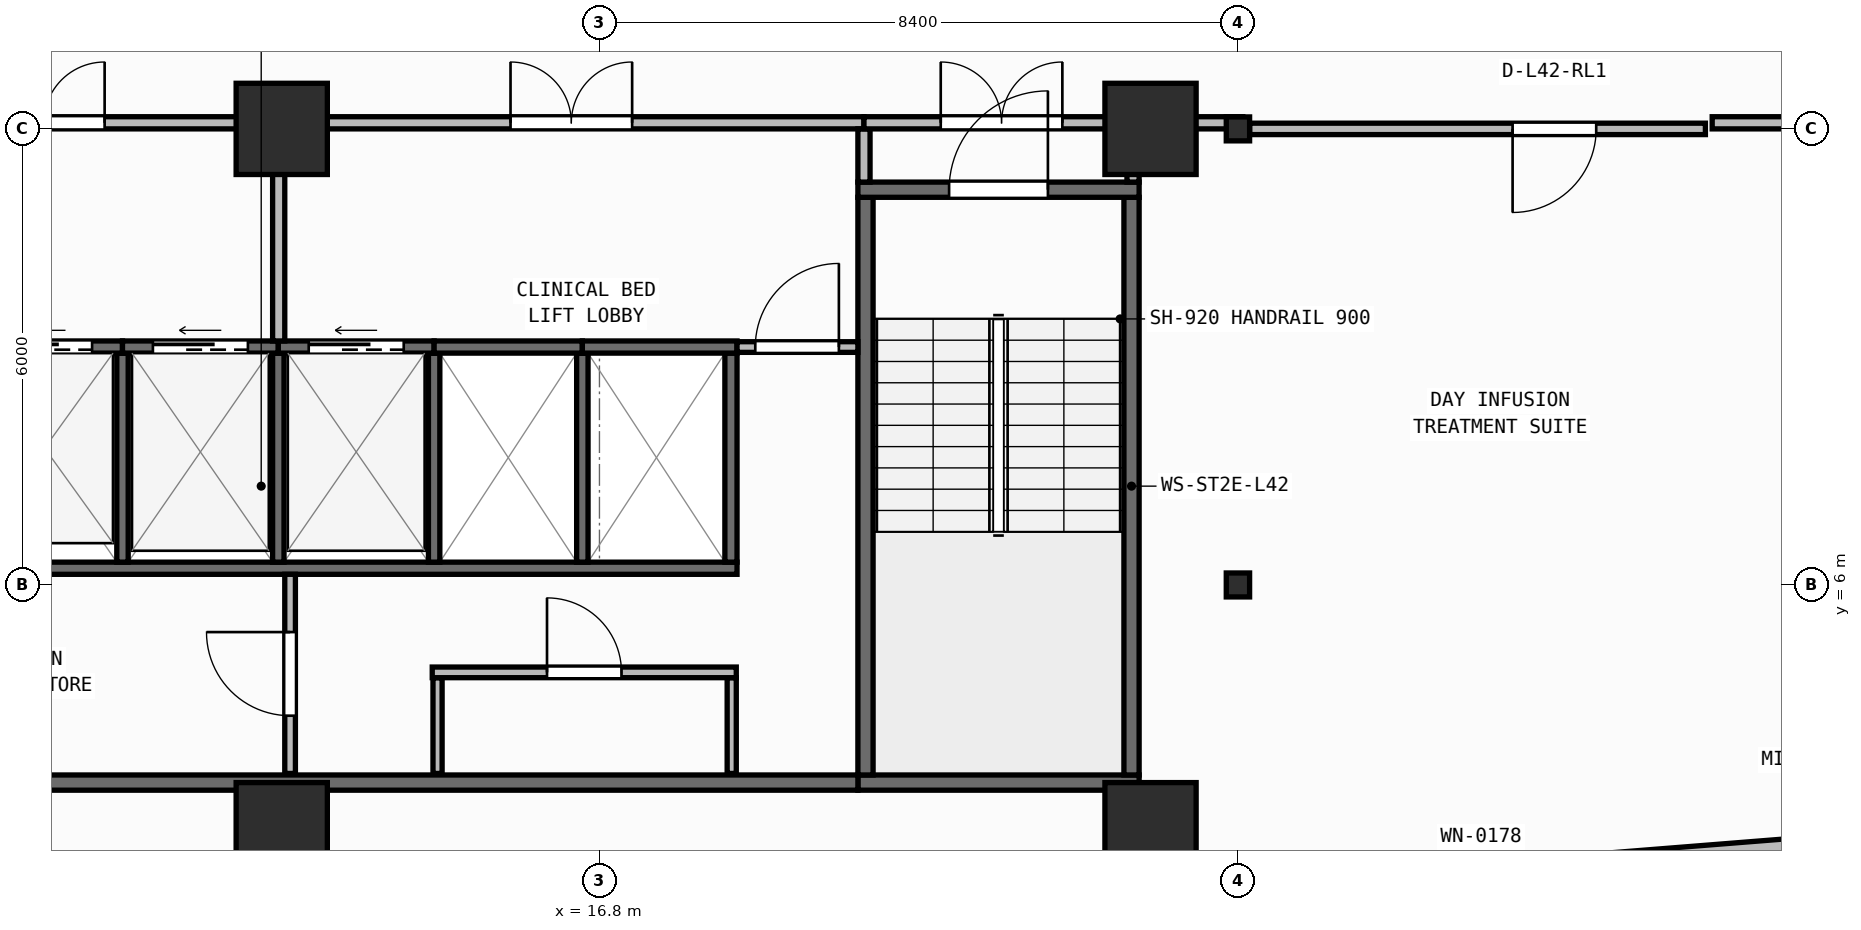
"""IFC4 building model, lengths in metres.
Left out: names, types, materials, properties, quantities, classifications, styles, units other than length and angle.
Written with IfcOpenShell. Run it as: python <this file> out.ifc"""

import sys

from ifc_helpers import new_model, si_unit, direction, frame, frame_2d, origin, origin_2d, place, context, subcontext, project, spatial, rectangle, i_section, extrude, element, fill, save


model = new_model("IFC4")
c1 = context("Model", 3, precision=1e-05, world=origin(), true_north=direction((0.0, 1.0)))
c2 = subcontext(c1, "Body", "Model", "MODEL_VIEW")
j1 = project(units=[si_unit("LENGTHUNIT", "METRE"), si_unit("PLANEANGLEUNIT", "RADIAN")], contexts=[c1])
p1 = place(None, origin())
s1 = spatial("IfcSite", under=j1, at=p1, CompositionType="ELEMENT")
p2 = place(p1, origin())
s2 = spatial("IfcBuilding", under=s1, at=p2, CompositionType="ELEMENT")
p3 = place(p2, frame((0.0, 0.0, 170.5)))
s3 = spatial("IfcBuildingStorey", under=s2, at=p3, CompositionType="ELEMENT", Elevation=170.5)
for number, where, z_axis, x_axis in (
    (1, (12.62, 2.8, 0.0), (0.0, 0.0, 1.0), (1.0, 0.0, 0.0)),
    (2, (24.05, 2.8, 0.0), (0.0, 0.0, 1.0), (1.0, 0.0, 0.0)),
):
    element("IfcColumn", number, at=place(p3, frame(where, z_axis=z_axis, x_axis=x_axis)), inside=s3, PredefinedType="COLUMN", context=c2, shape_type="SweptSolid", body=[
        extrude(rectangle(XDim=1.2, YDim=1.2, at=origin_2d()), origin(), (0.0, 0.0, 1.0), 3.95),
    ])
p4 = place(p3, frame((25.2, 6.0, 0.0), z_axis=(0.0, 0.0, 1.0), x_axis=(1.0, 0.0, 0.0)))
e3 = element("IfcColumn", 3, at=p4, inside=s3, PredefinedType="COLUMN", context=c2, shape_type="SweptSolid", body=[
    extrude(i_section(OverallWidth=0.307, OverallDepth=0.315, WebThickness=0.012, FlangeThickness=0.019, FilletRadius=0.017, at=origin_2d()), origin(), (0.0, 0.0, 1.0), 3.95),
])
for number, where, z_axis, x_axis in (
    (4, (12.62, 12.0, 0.0), (0.0, 0.0, 1.0), (1.0, 0.0, 0.0)),
    (5, (24.05, 12.0, 0.0), (0.0, 0.0, 1.0), (1.0, 0.0, 0.0)),
):
    element("IfcColumn", number, at=place(p3, frame(where, z_axis=z_axis, x_axis=x_axis)), inside=s3, PredefinedType="COLUMN", context=c2, shape_type="SweptSolid", body=[
        extrude(rectangle(XDim=1.2, YDim=1.2, at=origin_2d()), origin(), (0.0, 0.0, 1.0), 3.95),
    ])
p5 = place(p3, frame((25.2, 12.0, 0.0), z_axis=(0.0, 0.0, 1.0), x_axis=(1.0, 0.0, 0.0)))
e6 = element("IfcColumn", 6, at=p5, inside=s3, PredefinedType="COLUMN", context=c2, shape_type="SweptSolid", body=[
    extrude(i_section(OverallWidth=0.307, OverallDepth=0.315, WebThickness=0.012, FlangeThickness=0.019, FilletRadius=0.017, at=origin_2d()), origin(), (0.0, 0.0, 1.0), 3.95),
])
p6 = place(p3, frame((2.76, 0.173, 0.0), z_axis=(0.0, 0.0, 1.0), x_axis=(0.996857931723, 0.079210251617, 0.0)))
e7 = element("IfcWall", 7, at=p6, inside=s3, PredefinedType="STANDARD", context=c2, shape_type="SweptSolid", body=[
    extrude(rectangle(XDim=51.442, YDim=0.26, at=frame_2d((25.721, 0.0))), origin(), (0.0, 0.0, 1.0), 3.67),
])
p7 = place(p6, frame((24.521, 0.0, 0.9)))
e8 = element("IfcOpeningElement", 8, at=p7, cuts=e7, PredefinedType="OPENING", context=c2, shape_type="SweptSolid", body=[
    extrude(rectangle(XDim=2.4, YDim=1.65, at=frame_2d((1.2, 0.825))), frame((0.0, 0.14, 0.0), z_axis=(0.0, -1.0, 0.0), x_axis=(1.0, 0.0, 0.0)), (0.0, 0.0, 1.0), 0.28),
])
p8 = place(p3, frame((20.2, 3.4, 0.0), z_axis=(0.0, 0.0, 1.0), x_axis=(1.0, 0.0, 0.0)))
e9 = element("IfcWall", 9, at=p8, inside=s3, PredefinedType="SHEAR", context=c2, shape_type="SweptSolid", body=[
    extrude(rectangle(XDim=3.7, YDim=0.2, at=frame_2d((1.85, 0.0))), origin(), (0.0, 0.0, 1.0), 3.67),
])
for number, where, z_axis, x_axis in (
    (10, (20.3, 3.5, 0.0), (0.0, 0.0, 1.0), (0.0, 1.0, 0.0)),
    (11, (23.8, 3.5, 0.0), (0.0, 0.0, 1.0), (0.0, 1.0, 0.0)),
):
    element("IfcWall", number, at=place(p3, frame(where, z_axis=z_axis, x_axis=x_axis)), inside=s3, PredefinedType="SHEAR", context=c2, shape_type="SweptSolid", body=[
        extrude(rectangle(XDim=7.6, YDim=0.2, at=frame_2d((3.8, 0.0))), origin(), (0.0, 0.0, 1.0), 3.67),
    ])
p9 = place(p3, frame((20.2, 11.2, 0.0), z_axis=(0.0, 0.0, 1.0), x_axis=(1.0, 0.0, 0.0)))
e12 = element("IfcWall", 12, at=p9, inside=s3, PredefinedType="SHEAR", context=c2, shape_type="SweptSolid", body=[
    extrude(rectangle(XDim=3.7, YDim=0.2, at=frame_2d((1.85, 0.0))), origin(), (0.0, 0.0, 1.0), 3.67),
])
p10 = place(p9, frame((1.2, 0.0, 0.0)))
e13 = element("IfcOpeningElement", 13, at=p10, cuts=e12, PredefinedType="OPENING", context=c2, shape_type="SweptSolid", body=[
    extrude(rectangle(XDim=1.3, YDim=2.15, at=frame_2d((0.65, 1.075))), frame((0.0, 0.11, 0.0), z_axis=(0.0, -1.0, 0.0), x_axis=(1.0, 0.0, 0.0)), (0.0, 0.0, 1.0), 0.22),
])
p11 = place(p3, frame((6.5, 3.4, 0.0), z_axis=(0.0, 0.0, 1.0), x_axis=(1.0, 0.0, 0.0)))
e14 = element("IfcWall", 14, at=p11, inside=s3, PredefinedType="SHEAR", context=c2, shape_type="SweptSolid", body=[
    extrude(rectangle(XDim=13.7, YDim=0.2, at=frame_2d((6.85, 0.0))), origin(), (0.0, 0.0, 1.0), 3.67),
])
p12 = place(p3, frame((6.5, 6.22, 0.0), z_axis=(0.0, 0.0, 1.0), x_axis=(1.0, 0.0, 0.0)))
e15 = element("IfcWall", 15, at=p12, inside=s3, PredefinedType="SHEAR", context=c2, shape_type="SweptSolid", body=[
    extrude(rectangle(XDim=12.11, YDim=0.16, at=frame_2d((6.055, 0.0))), origin(), (0.0, 0.0, 1.0), 3.67),
])
p13 = place(p3, frame((18.53, 6.3, 0.0), z_axis=(0.0, 0.0, 1.0), x_axis=(0.0, 1.0, 0.0)))
e16 = element("IfcWall", 16, at=p13, inside=s3, PredefinedType="SHEAR", context=c2, shape_type="SweptSolid", body=[
    extrude(rectangle(XDim=2.75, YDim=0.16, at=frame_2d((1.375, 0.0))), origin(), (0.0, 0.0, 1.0), 3.67),
])
for number, where, z_axis, x_axis in (
    (17, (10.525, 6.3, 0.0), (0.0, 0.0, 1.0), (0.0, 1.0, 0.0)),
    (18, (12.575, 6.3, 0.0), (0.0, 0.0, 1.0), (0.0, 1.0, 0.0)),
    (19, (14.625, 6.3, 0.0), (0.0, 0.0, 1.0), (0.0, 1.0, 0.0)),
    (20, (16.575, 6.3, 0.0), (0.0, 0.0, 1.0), (0.0, 1.0, 0.0)),
):
    element("IfcWall", number, at=place(p3, frame(where, z_axis=z_axis, x_axis=x_axis)), inside=s3, PredefinedType="SHEAR", context=c2, shape_type="SweptSolid", body=[
        extrude(rectangle(XDim=2.75, YDim=0.15, at=frame_2d((1.375, 0.0))), origin(), (0.0, 0.0, 1.0), 3.67),
    ])
p14 = place(p3, frame((8.475, 9.13, 0.0), z_axis=(0.0, 0.0, 1.0), x_axis=(1.0, 0.0, 0.0)))
e21 = element("IfcWall", 21, at=p14, inside=s3, PredefinedType="SHEAR", context=c2, shape_type="SweptSolid", body=[
    extrude(rectangle(XDim=2.05, YDim=0.16, at=frame_2d((1.025, 0.0))), origin(), (0.0, 0.0, 1.0), 3.67),
])
p15 = place(p14, frame((0.4, 0.0, 0.0)))
e22 = element("IfcOpeningElement", 22, at=p15, cuts=e21, PredefinedType="OPENING", context=c2, shape_type="SweptSolid", body=[
    extrude(rectangle(XDim=1.25, YDim=2.15, at=frame_2d((0.625, 1.075))), frame((0.0, 0.09, 0.0), z_axis=(0.0, -1.0, 0.0), x_axis=(1.0, 0.0, 0.0)), (0.0, 0.0, 1.0), 0.18),
])
p16 = place(p3, frame((10.525, 9.13, 0.0), z_axis=(0.0, 0.0, 1.0), x_axis=(1.0, 0.0, 0.0)))
e23 = element("IfcWall", 23, at=p16, inside=s3, PredefinedType="SHEAR", context=c2, shape_type="SweptSolid", body=[
    extrude(rectangle(XDim=2.05, YDim=0.16, at=frame_2d((1.025, 0.0))), origin(), (0.0, 0.0, 1.0), 3.67),
])
p17 = place(p16, frame((0.4, 0.0, 0.0)))
e24 = element("IfcOpeningElement", 24, at=p17, cuts=e23, PredefinedType="OPENING", context=c2, shape_type="SweptSolid", body=[
    extrude(rectangle(XDim=1.25, YDim=2.15, at=frame_2d((0.625, 1.075))), frame((0.0, 0.09, 0.0), z_axis=(0.0, -1.0, 0.0), x_axis=(1.0, 0.0, 0.0)), (0.0, 0.0, 1.0), 0.18),
])
p18 = place(p3, frame((12.575, 9.13, 0.0), z_axis=(0.0, 0.0, 1.0), x_axis=(1.0, 0.0, 0.0)))
e25 = element("IfcWall", 25, at=p18, inside=s3, PredefinedType="SHEAR", context=c2, shape_type="SweptSolid", body=[
    extrude(rectangle(XDim=2.05, YDim=0.16, at=frame_2d((1.025, 0.0))), origin(), (0.0, 0.0, 1.0), 3.67),
])
p19 = place(p18, frame((0.4, 0.0, 0.0)))
e26 = element("IfcOpeningElement", 26, at=p19, cuts=e25, PredefinedType="OPENING", context=c2, shape_type="SweptSolid", body=[
    extrude(rectangle(XDim=1.25, YDim=2.15, at=frame_2d((0.625, 1.075))), frame((0.0, 0.09, 0.0), z_axis=(0.0, -1.0, 0.0), x_axis=(1.0, 0.0, 0.0)), (0.0, 0.0, 1.0), 0.18),
])
p20 = place(p3, frame((14.625, 9.13, 0.0), z_axis=(0.0, 0.0, 1.0), x_axis=(1.0, 0.0, 0.0)))
e27 = element("IfcWall", 27, at=p20, inside=s3, PredefinedType="SHEAR", context=c2, shape_type="SweptSolid", body=[
    extrude(rectangle(XDim=1.95, YDim=0.16, at=frame_2d((0.975, 0.0))), origin(), (0.0, 0.0, 1.0), 3.67),
])
p21 = place(p3, frame((16.575, 9.13, 0.0), z_axis=(0.0, 0.0, 1.0), x_axis=(1.0, 0.0, 0.0)))
e28 = element("IfcWall", 28, at=p21, inside=s3, PredefinedType="SHEAR", context=c2, shape_type="SweptSolid", body=[
    extrude(rectangle(XDim=2.035, YDim=0.16, at=frame_2d((1.018, 0.0))), origin(), (0.0, 0.0, 1.0), 3.67),
])
p22 = place(p3, frame((12.73, 3.52, 0.0), z_axis=(0.0, 0.0, 1.0), x_axis=(0.0, 1.0, 0.0)))
e29 = element("IfcWall", 29, at=p22, inside=s3, PredefinedType="PARTITIONING", context=c2, shape_type="SweptSolid", body=[
    extrude(rectangle(XDim=2.62, YDim=0.14, at=frame_2d((1.31, 0.0))), origin(), (0.0, 0.0, 1.0), 3.67),
])
p23 = place(p22, frame((0.76, 0.0, 0.0)))
e30 = element("IfcOpeningElement", 30, at=p23, cuts=e29, PredefinedType="OPENING", context=c2, shape_type="SweptSolid", body=[
    extrude(rectangle(XDim=1.1, YDim=2.1, at=frame_2d((0.55, 1.05))), frame((0.0, 0.08, 0.0), z_axis=(0.0, -1.0, 0.0), x_axis=(1.0, 0.0, 0.0)), (0.0, 0.0, 1.0), 0.16),
])
for number, where, z_axis, x_axis in (
    (31, (14.67, 3.52, 0.0), (0.0, 0.0, 1.0), (0.0, 1.0, 0.0)),
    (32, (18.54, 3.52, 0.0), (0.0, 0.0, 1.0), (0.0, 1.0, 0.0)),
):
    element("IfcWall", number, at=place(p3, frame(where, z_axis=z_axis, x_axis=x_axis)), inside=s3, PredefinedType="PARTITIONING", context=c2, shape_type="SweptSolid", body=[
        extrude(rectangle(XDim=1.26, YDim=0.12, at=frame_2d((0.63, 0.0))), origin(), (0.0, 0.0, 1.0), 3.67),
    ])
p24 = place(p3, frame((14.6, 4.85, 0.0), z_axis=(0.0, 0.0, 1.0), x_axis=(1.0, 0.0, 0.0)))
e33 = element("IfcWall", 33, at=p24, inside=s3, PredefinedType="PARTITIONING", context=c2, shape_type="SweptSolid", body=[
    extrude(rectangle(XDim=4.0, YDim=0.14, at=frame_2d((2.0, 0.0))), origin(), (0.0, 0.0, 1.0), 3.67),
])
p25 = place(p24, frame((1.51, 0.0, 0.0)))
e34 = element("IfcOpeningElement", 34, at=p25, cuts=e33, PredefinedType="OPENING", context=c2, shape_type="SweptSolid", body=[
    extrude(rectangle(XDim=0.98, YDim=2.1, at=frame_2d((0.49, 1.05))), frame((0.0, 0.08, 0.0), z_axis=(0.0, -1.0, 0.0), x_axis=(1.0, 0.0, 0.0)), (0.0, 0.0, 1.0), 0.16),
])
p26 = place(p3, frame((18.61, 9.13, 0.0), z_axis=(0.0, 0.0, 1.0), x_axis=(1.0, 0.0, 0.0)))
e35 = element("IfcWall", 35, at=p26, inside=s3, PredefinedType="PARTITIONING", context=c2, shape_type="SweptSolid", body=[
    extrude(rectangle(XDim=1.59, YDim=0.14, at=frame_2d((0.795, 0.0))), origin(), (0.0, 0.0, 1.0), 3.67),
])
p27 = place(p26, frame((0.24, 0.0, 0.0)))
e36 = element("IfcOpeningElement", 36, at=p27, cuts=e35, PredefinedType="OPENING", context=c2, shape_type="SweptSolid", body=[
    extrude(rectangle(XDim=1.1, YDim=2.1, at=frame_2d((0.55, 1.05))), frame((0.0, 0.08, 0.0), z_axis=(0.0, -1.0, 0.0), x_axis=(1.0, 0.0, 0.0)), (0.0, 0.0, 1.0), 0.16),
])
p28 = place(p3, frame((6.4, 12.08, 0.0), z_axis=(0.0, 0.0, 1.0), x_axis=(1.0, 0.0, 0.0)))
e37 = element("IfcWall", 37, at=p28, inside=s3, PredefinedType="PARTITIONING", context=c2, shape_type="SweptSolid", body=[
    extrude(rectangle(XDim=6.18, YDim=0.16, at=frame_2d((3.09, 0.0))), origin(), (0.0, 0.0, 1.0), 3.043),
])
p29 = place(p28, frame((2.29, 0.0, 0.0)))
e38 = element("IfcOpeningElement", 38, at=p29, cuts=e37, PredefinedType="OPENING", context=c2, shape_type="SweptSolid", body=[
    extrude(rectangle(XDim=1.6, YDim=2.05, at=frame_2d((0.8, 1.025))), frame((0.0, 0.09, 0.0), z_axis=(0.0, -1.0, 0.0), x_axis=(1.0, 0.0, 0.0)), (0.0, 0.0, 1.0), 0.18),
])
p30 = place(p3, frame((12.58, 9.21, 0.0), z_axis=(0.0, 0.0, 1.0), x_axis=(0.0, 1.0, 0.0)))
e39 = element("IfcWall", 39, at=p30, inside=s3, PredefinedType="PARTITIONING", context=c2, shape_type="SweptSolid", body=[
    extrude(rectangle(XDim=2.79, YDim=0.16, at=frame_2d((1.395, 0.0))), origin(), (0.0, 0.0, 1.0), 3.67),
])
p31 = place(p3, frame((12.58, 12.08, 0.0), z_axis=(0.0, 0.0, 1.0), x_axis=(1.0, 0.0, 0.0)))
e40 = element("IfcWall", 40, at=p31, inside=s3, PredefinedType="PARTITIONING", context=c2, shape_type="SweptSolid", body=[
    extrude(rectangle(XDim=7.7, YDim=0.16, at=frame_2d((3.85, 0.0))), origin(), (0.0, 0.0, 1.0), 3.043),
])
p32 = place(p31, frame((3.05, 0.0, 0.0)))
e41 = element("IfcOpeningElement", 41, at=p32, cuts=e40, PredefinedType="OPENING", context=c2, shape_type="SweptSolid", body=[
    extrude(rectangle(XDim=1.6, YDim=2.05, at=frame_2d((0.8, 1.025))), frame((0.0, 0.09, 0.0), z_axis=(0.0, -1.0, 0.0), x_axis=(1.0, 0.0, 0.0)), (0.0, 0.0, 1.0), 0.18),
])
p33 = place(p3, frame((20.28, 11.3, 0.0), z_axis=(0.0, 0.0, 1.0), x_axis=(0.0, 1.0, 0.0)))
e42 = element("IfcWall", 42, at=p33, inside=s3, PredefinedType="PARTITIONING", context=c2, shape_type="SweptSolid", body=[
    extrude(rectangle(XDim=0.7, YDim=0.16, at=frame_2d((0.35, 0.0))), origin(), (0.0, 0.0, 1.0), 3.67),
])
p34 = place(p3, frame((20.28, 12.08, 0.0), z_axis=(0.0, 0.0, 1.0), x_axis=(1.0, 0.0, 0.0)))
e43 = element("IfcWall", 43, at=p34, inside=s3, PredefinedType="PARTITIONING", context=c2, shape_type="SweptSolid", body=[
    extrude(rectangle(XDim=3.62, YDim=0.16, at=frame_2d((1.81, 0.0))), origin(), (0.0, 0.0, 1.0), 3.043),
])
p35 = place(p34, frame((1.01, 0.0, 0.0)))
e44 = element("IfcOpeningElement", 44, at=p35, cuts=e43, PredefinedType="OPENING", context=c2, shape_type="SweptSolid", body=[
    extrude(rectangle(XDim=1.6, YDim=2.05, at=frame_2d((0.8, 1.025))), frame((0.0, 0.09, 0.0), z_axis=(0.0, -1.0, 0.0), x_axis=(1.0, 0.0, 0.0)), (0.0, 0.0, 1.0), 0.18),
])
p36 = place(p3, frame((23.82, 11.3, 0.0), z_axis=(0.0, 0.0, 1.0), x_axis=(0.0, 1.0, 0.0)))
e45 = element("IfcWall", 45, at=p36, inside=s3, PredefinedType="PARTITIONING", context=c2, shape_type="SweptSolid", body=[
    extrude(rectangle(XDim=0.7, YDim=0.16, at=frame_2d((0.35, 0.0))), origin(), (0.0, 0.0, 1.0), 3.67),
])
p37 = place(p3, frame((31.35, 12.0, 0.0), z_axis=(0.0, 0.0, 1.0), x_axis=(-1.0, 0.0, 0.0)))
e46 = element("IfcWall", 46, at=p37, inside=s3, PredefinedType="PARTITIONING", context=c2, shape_type="SweptSolid", body=[
    extrude(rectangle(XDim=5.997, YDim=0.15, at=frame_2d((2.998, 0.0))), origin(), (0.0, 0.0, 1.0), 3.043),
])
p38 = place(p37, frame((1.437, 0.0, 0.0)))
e47 = element("IfcOpeningElement", 47, at=p38, cuts=e46, PredefinedType="OPENING", context=c2, shape_type="SweptSolid", body=[
    extrude(rectangle(XDim=1.1, YDim=2.1, at=frame_2d((0.55, 1.05))), frame((0.0, 0.085, 0.0), z_axis=(0.0, -1.0, 0.0), x_axis=(1.0, 0.0, 0.0)), (0.0, 0.0, 1.0), 0.17),
])
p39 = place(p3, frame((24.02, 12.08, 0.0), z_axis=(0.0, 0.0, 1.0), x_axis=(1.0, 0.0, 0.0)))
e48 = element("IfcWall", 48, at=p39, inside=s3, PredefinedType="PARTITIONING", context=c2, shape_type="SweptSolid", body=[
    extrude(rectangle(XDim=1.244, YDim=0.16, at=frame_2d((0.622, 0.0))), origin(), (0.0, 0.0, 1.0), 3.043),
])
p40 = place(p3, frame((31.439, 12.08, 0.0), z_axis=(0.0, 0.0, 1.0), x_axis=(1.0, 0.0, 0.0)))
e49 = element("IfcWall", 49, at=p40, inside=s3, PredefinedType="PARTITIONING", context=c2, shape_type="SweptSolid", body=[
    extrude(rectangle(XDim=2.631, YDim=0.16, at=frame_2d((1.315, 0.0))), origin(), (0.0, 0.0, 1.0), 3.043),
])
p41 = place(p10, origin())
e50 = element("IfcDoor", 50, at=p41, inside=s3, OperationType="SINGLE_SWING_RIGHT", PredefinedType="DOOR", context=c2, shape_type="SweptSolid", body=[
    extrude(rectangle(XDim=1.3, YDim=2.15, at=frame_2d((0.65, 1.075))), frame((0.0, 0.025, 0.0), z_axis=(0.0, -1.0, 0.0), x_axis=(1.0, 0.0, 0.0)), (0.0, 0.0, 1.0), 0.05),
])
fill(e13, e50)
p42 = place(p15, origin())
e51 = element("IfcDoor", 51, at=p42, inside=s3, OperationType="SLIDING_TO_LEFT", PredefinedType="DOOR", context=c2, shape_type="SweptSolid", body=[
    extrude(rectangle(XDim=1.25, YDim=2.15, at=frame_2d((0.625, 1.075))), frame((0.0, 0.025, 0.0), z_axis=(0.0, -1.0, 0.0), x_axis=(1.0, 0.0, 0.0)), (0.0, 0.0, 1.0), 0.05),
])
fill(e22, e51)
p43 = place(p17, origin())
e52 = element("IfcDoor", 52, at=p43, inside=s3, OperationType="SLIDING_TO_LEFT", PredefinedType="DOOR", context=c2, shape_type="SweptSolid", body=[
    extrude(rectangle(XDim=1.25, YDim=2.15, at=frame_2d((0.625, 1.075))), frame((0.0, 0.025, 0.0), z_axis=(0.0, -1.0, 0.0), x_axis=(1.0, 0.0, 0.0)), (0.0, 0.0, 1.0), 0.05),
])
fill(e24, e52)
p44 = place(p19, origin())
e53 = element("IfcDoor", 53, at=p44, inside=s3, OperationType="SLIDING_TO_LEFT", PredefinedType="DOOR", context=c2, shape_type="SweptSolid", body=[
    extrude(rectangle(XDim=1.25, YDim=2.15, at=frame_2d((0.625, 1.075))), frame((0.0, 0.025, 0.0), z_axis=(0.0, -1.0, 0.0), x_axis=(1.0, 0.0, 0.0)), (0.0, 0.0, 1.0), 0.05),
])
fill(e26, e53)
p45 = place(p23, origin())
e54 = element("IfcDoor", 54, at=p45, inside=s3, OperationType="SINGLE_SWING_RIGHT", PredefinedType="DOOR", context=c2, shape_type="SweptSolid", body=[
    extrude(rectangle(XDim=1.1, YDim=2.1, at=frame_2d((0.55, 1.05))), frame((0.0, 0.025, 0.0), z_axis=(0.0, -1.0, 0.0), x_axis=(1.0, 0.0, 0.0)), (0.0, 0.0, 1.0), 0.05),
])
fill(e30, e54)
p46 = place(p25, origin())
e55 = element("IfcDoor", 55, at=p46, inside=s3, OperationType="SINGLE_SWING_LEFT", PredefinedType="DOOR", context=c2, shape_type="SweptSolid", body=[
    extrude(rectangle(XDim=0.98, YDim=2.1, at=frame_2d((0.49, 1.05))), frame((0.0, 0.025, 0.0), z_axis=(0.0, -1.0, 0.0), x_axis=(1.0, 0.0, 0.0)), (0.0, 0.0, 1.0), 0.05),
])
fill(e34, e55)
p47 = place(p27, origin())
e56 = element("IfcDoor", 56, at=p47, inside=s3, OperationType="SINGLE_SWING_RIGHT", PredefinedType="DOOR", context=c2, shape_type="SweptSolid", body=[
    extrude(rectangle(XDim=1.1, YDim=2.1, at=frame_2d((0.55, 1.05))), frame((0.0, 0.025, 0.0), z_axis=(0.0, -1.0, 0.0), x_axis=(1.0, 0.0, 0.0)), (0.0, 0.0, 1.0), 0.05),
])
fill(e36, e56)
p48 = place(p29, origin())
e57 = element("IfcDoor", 57, at=p48, inside=s3, OperationType="DOUBLE_DOOR_SINGLE_SWING", PredefinedType="DOOR", context=c2, shape_type="SweptSolid", body=[
    extrude(rectangle(XDim=1.6, YDim=2.05, at=frame_2d((0.8, 1.025))), frame((0.0, 0.025, 0.0), z_axis=(0.0, -1.0, 0.0), x_axis=(1.0, 0.0, 0.0)), (0.0, 0.0, 1.0), 0.05),
])
fill(e38, e57)
p49 = place(p32, origin())
e58 = element("IfcDoor", 58, at=p49, inside=s3, OperationType="DOUBLE_DOOR_SINGLE_SWING", PredefinedType="DOOR", context=c2, shape_type="SweptSolid", body=[
    extrude(rectangle(XDim=1.6, YDim=2.05, at=frame_2d((0.8, 1.025))), frame((0.0, 0.025, 0.0), z_axis=(0.0, -1.0, 0.0), x_axis=(1.0, 0.0, 0.0)), (0.0, 0.0, 1.0), 0.05),
])
fill(e41, e58)
p50 = place(p35, origin())
e59 = element("IfcDoor", 59, at=p50, inside=s3, OperationType="DOUBLE_DOOR_SINGLE_SWING", PredefinedType="DOOR", context=c2, shape_type="SweptSolid", body=[
    extrude(rectangle(XDim=1.6, YDim=2.05, at=frame_2d((0.8, 1.025))), frame((0.0, 0.025, 0.0), z_axis=(0.0, -1.0, 0.0), x_axis=(1.0, 0.0, 0.0)), (0.0, 0.0, 1.0), 0.05),
])
fill(e44, e59)
p51 = place(p38, origin())
e60 = element("IfcDoor", 60, at=p51, inside=s3, OperationType="SINGLE_SWING_RIGHT", PredefinedType="DOOR", context=c2, shape_type="SweptSolid", body=[
    extrude(rectangle(XDim=1.1, YDim=2.1, at=frame_2d((0.55, 1.05))), frame((0.0, 0.025, 0.0), z_axis=(0.0, -1.0, 0.0), x_axis=(1.0, 0.0, 0.0)), (0.0, 0.0, 1.0), 0.05),
])
fill(e47, e60)
save(model, sys.argv[1])
